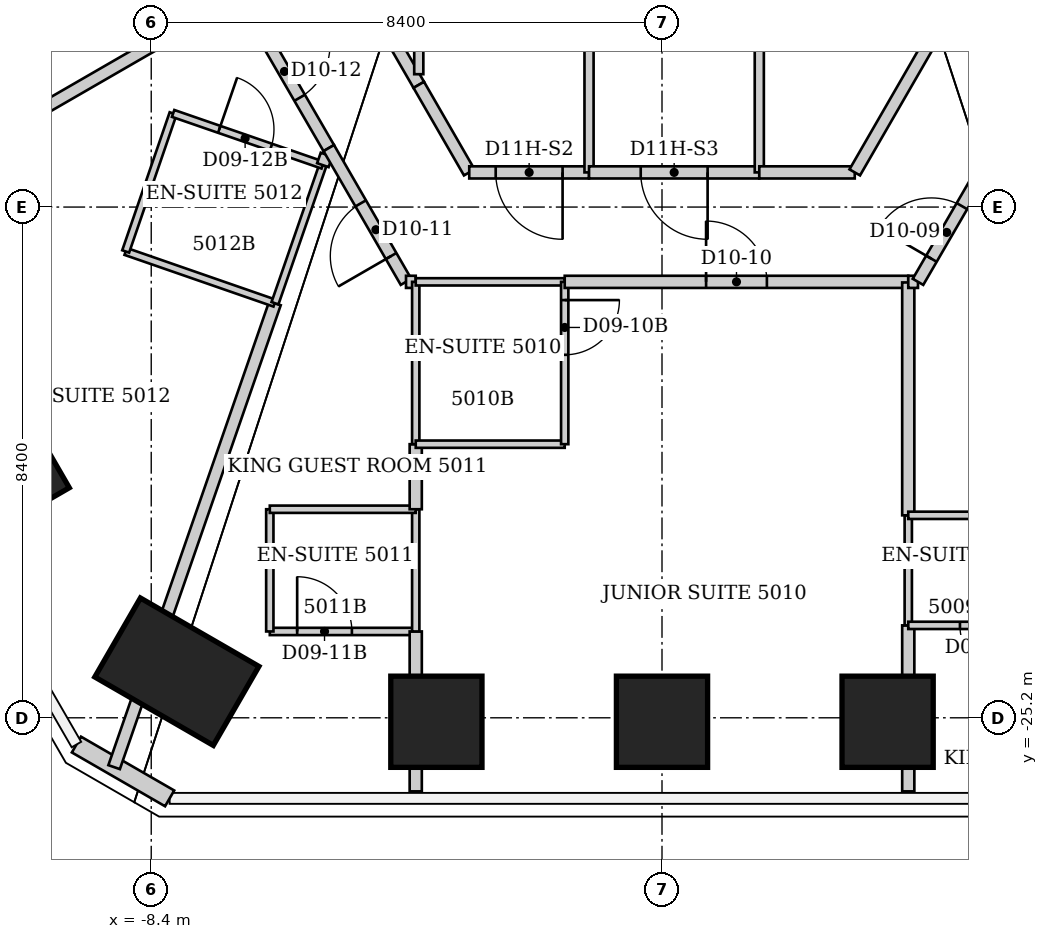
"""IFC4 building model, lengths in metres.
Left out: names, types, materials, properties, quantities, classifications, styles, units other than length and angle.
Written with IfcOpenShell. Run it as: python <this file> out.ifc"""

import sys

from ifc_helpers import new_model, si_unit, direction, frame, frame_2d, origin, origin_2d, place, context, subcontext, project, spatial, rectangle, extrude, element, fill, save


model = new_model("IFC4")
c1 = context("Model", 3, precision=1e-05, world=origin(), true_north=direction((0.0, 1.0)))
c2 = subcontext(c1, "Body", "Model", "MODEL_VIEW")
j1 = project(units=[si_unit("LENGTHUNIT", "METRE"), si_unit("PLANEANGLEUNIT", "RADIAN")], contexts=[c1])
p1 = place(None, origin())
s1 = spatial("IfcSite", under=j1, at=p1, CompositionType="ELEMENT")
p2 = place(p1, origin())
s2 = spatial("IfcBuilding", under=s1, at=p2, CompositionType="ELEMENT")
p3 = place(p2, frame((0.0, 0.0, 202.2)))
s3 = spatial("IfcBuildingStorey", under=s2, at=p3, CompositionType="ELEMENT", Elevation=202.2)
for number, where, z_axis, x_axis in (
    (1, (3.71, -25.265, 0.0), (0.0, 0.0, 1.0), (0.0, -1.0, 0.0)),
    (2, (0.0, -25.265, 0.0), (0.0, 0.0, 1.0), (0.0, -1.0, 0.0)),
    (3, (-3.71, -25.265, 0.0), (0.0, 0.0, 1.0), (0.0, -1.0, 0.0)),
):
    element("IfcColumn", number, at=place(p3, frame(where, z_axis=z_axis, x_axis=x_axis)), inside=s3, PredefinedType="COLUMN", context=c2, shape_type="SweptSolid", body=[
        extrude(rectangle(XDim=1.5, YDim=1.5, at=origin_2d()), origin(), (0.0, 0.0, 1.0), 3.8),
    ])
p4 = place(p3, frame((-7.979, -24.442, 0.0), z_axis=(0.0, 0.0, 1.0), x_axis=(-0.5, -0.866025403784, 0.0)))
e4 = element("IfcColumn", 4, at=p4, inside=s3, PredefinedType="COLUMN", context=c2, shape_type="SweptSolid", body=[
    extrude(rectangle(XDim=1.5, YDim=2.25, at=origin_2d()), origin(), (0.0, 0.0, 1.0), 3.8),
])
p5 = place(p3, frame((-10.772, -21.142, 0.0), z_axis=(0.0, 0.0, 1.0), x_axis=(-0.866025403784, -0.5, 0.0)))
e5 = element("IfcColumn", 5, at=p5, inside=s3, PredefinedType="COLUMN", context=c2, shape_type="SweptSolid", body=[
    extrude(rectangle(XDim=1.5, YDim=1.5, at=origin_2d()), origin(), (0.0, 0.0, 1.0), 3.8),
])
p6 = place(p3, frame((-8.097, -26.525, 0.0), z_axis=(0.0, 0.0, 1.0), x_axis=(-0.866036293601, 0.499981137809, 0.0)))
e6 = element("IfcWall", 6, at=p6, inside=s3, PredefinedType="SOLIDWALL", context=c2, shape_type="SweptSolid", body=[
    extrude(rectangle(XDim=1.77, YDim=0.3, at=frame_2d((0.885, 0.0))), origin(), (0.0, 0.0, 1.0), 3.64),
])
p7 = place(p3, frame((-14.274, -17.545, 0.0), z_axis=(0.0, 0.0, 1.0), x_axis=(0.865985626634, 0.500068889717, 0.0)))
e7 = element("IfcWall", 7, at=p7, inside=s3, PredefinedType="PARTITIONING", context=c2, shape_type="SweptSolid", body=[
    extrude(rectangle(XDim=8.459, YDim=0.2, at=frame_2d((4.229, 0.0))), origin(), (0.0, 0.0, 1.0), 3.64),
])
p8 = place(p3, frame((-9.01, -26.012, 0.0), z_axis=(0.0, 0.0, 1.0), x_axis=(0.32759647282, 0.944817734272, 0.0)))
e8 = element("IfcWall", 8, at=p8, inside=s3, PredefinedType="PARTITIONING", context=c2, shape_type="SweptSolid", body=[
    extrude(rectangle(XDim=8.075, YDim=0.2, at=frame_2d((4.038, 0.0))), origin(), (0.0, 0.0, 1.0), 3.64),
])
p9 = place(p3, frame((-8.82, -17.53, 0.0), z_axis=(0.0, 0.0, 1.0), x_axis=(0.944753042377, -0.327782990589, 0.0)))
e9 = element("IfcWall", 9, at=p9, inside=s3, PredefinedType="PARTITIONING", context=c2, shape_type="SweptSolid", body=[
    extrude(rectangle(XDim=2.594, YDim=0.12, at=frame_2d((1.297, 0.0))), origin(), (0.0, 0.0, 1.0), 3.64),
])
p10 = place(p3, frame((-8.04, -15.26, 0.0), z_axis=(0.0, 0.0, 1.0), x_axis=(-0.324971746724, -0.945723724896, 0.0)))
e10 = element("IfcWall", 10, at=p10, inside=s3, PredefinedType="PARTITIONING", context=c2, shape_type="SweptSolid", body=[
    extrude(rectangle(XDim=2.4, YDim=0.12, at=frame_2d((1.2, 0.0))), origin(), (0.0, 0.0, 1.0), 3.64),
])
p11 = place(p3, frame((-6.94, -13.31, 0.0), z_axis=(0.0, 0.0, 1.0), x_axis=(0.501293994647, -0.865277025542, 0.0)))
e11 = element("IfcWall", 11, at=p11, inside=s3, PredefinedType="PARTITIONING", context=c2, shape_type="SweptSolid", body=[
    extrude(rectangle(XDim=2.912, YDim=0.2, at=frame_2d((1.456, 0.0))), origin(), (0.0, 0.0, 1.0), 3.64),
])
p12 = place(p11, frame((0.956, 0.0, 0.0)))
e12 = element("IfcOpeningElement", 12, at=p12, cuts=e11, PredefinedType="OPENING", context=c2, shape_type="SweptSolid", body=[
    extrude(rectangle(XDim=1.0, YDim=2.13, at=frame_2d((0.5, 1.065))), frame((0.0, 0.1, 0.0), z_axis=(0.0, -1.0, 0.0), x_axis=(1.0, 0.0, 0.0)), (0.0, 0.0, 1.0), 0.2),
])
p13 = place(p3, frame((-6.45, -23.78, 0.0), z_axis=(0.0, 0.0, 1.0), x_axis=(1.0, 0.0, 0.0)))
e13 = element("IfcWall", 13, at=p13, inside=s3, PredefinedType="PARTITIONING", context=c2, shape_type="SweptSolid", body=[
    extrude(rectangle(XDim=2.4, YDim=0.12, at=frame_2d((1.2, 0.0))), origin(), (0.0, 0.0, 1.0), 3.64),
])
p14 = place(p13, frame((0.45, 0.0, 0.0)))
e14 = element("IfcOpeningElement", 14, at=p14, cuts=e13, PredefinedType="OPENING", context=c2, shape_type="SweptSolid", body=[
    extrude(rectangle(XDim=0.9, YDim=2.03, at=frame_2d((0.45, 1.015))), frame((0.0, 0.06, 0.0), z_axis=(0.0, -1.0, 0.0), x_axis=(1.0, 0.0, 0.0)), (0.0, 0.0, 1.0), 0.12),
])
p15 = place(p3, frame((-6.45, -21.77, 0.0), z_axis=(0.0, 0.0, 1.0), x_axis=(0.0, -1.0, 0.0)))
e15 = element("IfcWall", 15, at=p15, inside=s3, PredefinedType="PARTITIONING", context=c2, shape_type="SweptSolid", body=[
    extrude(rectangle(XDim=2.01, YDim=0.12, at=frame_2d((1.005, 0.0))), origin(), (0.0, 0.0, 1.0), 3.64),
])
p16 = place(p3, frame((-6.365, -18.382, 0.0), z_axis=(0.0, 0.0, 1.0), x_axis=(0.327571022417, 0.944826558302, 0.0)))
e16 = element("IfcWall", 16, at=p16, inside=s3, PredefinedType="PARTITIONING", context=c2, shape_type="SweptSolid", body=[
    extrude(rectangle(XDim=2.404, YDim=0.12, at=frame_2d((1.202, 0.0))), origin(), (0.0, 0.0, 1.0), 3.64),
])
p17 = place(p3, frame((-5.58, -16.11, 0.0), z_axis=(0.0, 0.0, 1.0), x_axis=(-0.94515546045, 0.326620813149, 0.0)))
e17 = element("IfcWall", 17, at=p17, inside=s3, PredefinedType="PARTITIONING", context=c2, shape_type="SweptSolid", body=[
    extrude(rectangle(XDim=2.603, YDim=0.12, at=frame_2d((1.301, 0.0))), origin(), (0.0, 0.0, 1.0), 3.64),
])
p18 = place(p17, frame((0.9, 0.0, 0.0)))
e18 = element("IfcOpeningElement", 18, at=p18, cuts=e17, PredefinedType="OPENING", context=c2, shape_type="SweptSolid", body=[
    extrude(rectangle(XDim=0.9, YDim=2.03, at=frame_2d((0.45, 1.015))), frame((0.0, 0.06, 0.0), z_axis=(0.0, -1.0, 0.0), x_axis=(1.0, 0.0, 0.0)), (0.0, 0.0, 1.0), 0.12),
])
p19 = place(p3, frame((-5.577, -16.111, 0.0), z_axis=(0.0, 0.0, 1.0), x_axis=(0.328260778463, 0.944587138025, 0.0)))
e19 = element("IfcWall", 19, at=p19, inside=s3, PredefinedType="PARTITIONING", context=c2, shape_type="SweptSolid", body=[
    extrude(rectangle(XDim=0.182, YDim=0.2, at=frame_2d((0.091, 0.0))), origin(), (0.0, 0.0, 1.0), 3.64),
])
p20 = place(p3, frame((-5.48, -15.83, 0.0), z_axis=(0.0, 0.0, 1.0), x_axis=(0.499963722229, -0.866046347752, 0.0)))
e20 = element("IfcWall", 20, at=p20, inside=s3, PredefinedType="PARTITIONING", context=c2, shape_type="SweptSolid", body=[
    extrude(rectangle(XDim=2.54, YDim=0.2, at=frame_2d((1.27, 0.0))), origin(), (0.0, 0.0, 1.0), 3.64),
])
p21 = place(p20, frame((1.05, 0.0, 0.0)))
e21 = element("IfcOpeningElement", 21, at=p21, cuts=e20, PredefinedType="OPENING", context=c2, shape_type="SweptSolid", body=[
    extrude(rectangle(XDim=1.0, YDim=2.13, at=frame_2d((0.5, 1.065))), frame((0.0, 0.1, 0.0), z_axis=(0.0, -1.0, 0.0), x_axis=(1.0, 0.0, 0.0)), (0.0, 0.0, 1.0), 0.2),
])
p22 = place(p3, frame((-4.21, -18.03, 0.0), z_axis=(0.0, 0.0, 1.0), x_axis=(1.0, 0.0, 0.0)))
e22 = element("IfcWall", 22, at=p22, inside=s3, PredefinedType="PARTITIONING", context=c2, shape_type="SweptSolid", body=[
    extrude(rectangle(XDim=0.16, YDim=0.2, at=frame_2d((0.08, 0.0))), origin(), (0.0, 0.0, 1.0), 3.64),
])
p23 = place(p3, frame((-4.05, -26.41, 0.0), z_axis=(0.0, 0.0, 1.0), x_axis=(0.0, 1.0, 0.0)))
e23 = element("IfcWall", 23, at=p23, inside=s3, PredefinedType="PARTITIONING", context=c2, shape_type="SweptSolid", body=[
    extrude(rectangle(XDim=2.63, YDim=0.2, at=frame_2d((1.315, 0.0))), origin(), (0.0, 0.0, 1.0), 3.64),
])
p24 = place(p3, frame((-4.05, -23.78, 0.0), z_axis=(0.0, 0.0, 1.0), x_axis=(0.0, 1.0, 0.0)))
e24 = element("IfcWall", 24, at=p24, inside=s3, PredefinedType="PARTITIONING", context=c2, shape_type="SweptSolid", body=[
    extrude(rectangle(XDim=2.01, YDim=0.12, at=frame_2d((1.005, 0.0))), origin(), (0.0, 0.0, 1.0), 3.64),
])
p25 = place(p3, frame((-4.05, -21.77, 0.0), z_axis=(0.0, 0.0, 1.0), x_axis=(-1.0, 0.0, 0.0)))
e25 = element("IfcWall", 25, at=p25, inside=s3, PredefinedType="PARTITIONING", context=c2, shape_type="SweptSolid", body=[
    extrude(rectangle(XDim=2.4, YDim=0.12, at=frame_2d((1.2, 0.0))), origin(), (0.0, 0.0, 1.0), 3.64),
])
p26 = place(p3, frame((-4.05, -21.77, 0.0), z_axis=(0.0, 0.0, 1.0), x_axis=(0.0, 1.0, 0.0)))
e26 = element("IfcWall", 26, at=p26, inside=s3, PredefinedType="PARTITIONING", context=c2, shape_type="SweptSolid", body=[
    extrude(rectangle(XDim=1.07, YDim=0.2, at=frame_2d((0.535, 0.0))), origin(), (0.0, 0.0, 1.0), 3.64),
])
p27 = place(p3, frame((-4.05, -20.7, 0.0), z_axis=(0.0, 0.0, 1.0), x_axis=(0.0, 1.0, 0.0)))
e27 = element("IfcWall", 27, at=p27, inside=s3, PredefinedType="PARTITIONING", context=c2, shape_type="SweptSolid", body=[
    extrude(rectangle(XDim=2.67, YDim=0.12, at=frame_2d((1.335, 0.0))), origin(), (0.0, 0.0, 1.0), 3.64),
])
for number, where, z_axis, x_axis in (
    (28, (-4.05, -20.7, 0.0), (0.0, 0.0, 1.0), (1.0, 0.0, 0.0)),
    (29, (-4.05, -18.03, 0.0), (0.0, 0.0, 1.0), (1.0, 0.0, 0.0)),
):
    element("IfcWall", number, at=place(p3, frame(where, z_axis=z_axis, x_axis=x_axis)), inside=s3, PredefinedType="PARTITIONING", context=c2, shape_type="SweptSolid", body=[
        extrude(rectangle(XDim=2.45, YDim=0.12, at=frame_2d((1.225, 0.0))), origin(), (0.0, 0.0, 1.0), 3.64),
    ])
p28 = place(p3, frame((-4.0, -14.79, 0.0), z_axis=(0.0, 0.0, 1.0), x_axis=(-0.499916512745, 0.866073599808, 0.0)))
e30 = element("IfcWall", 30, at=p28, inside=s3, PredefinedType="PARTITIONING", context=c2, shape_type="SweptSolid", body=[
    extrude(rectangle(XDim=8.821, YDim=0.2, at=frame_2d((4.411, 0.0))), origin(), (0.0, 0.0, 1.0), 3.64),
])
p29 = place(p28, frame((3.861, 0.0, 0.0)))
e31 = element("IfcOpeningElement", 31, at=p29, cuts=e30, PredefinedType="OPENING", context=c2, shape_type="SweptSolid", body=[
    extrude(rectangle(XDim=1.1, YDim=2.2, at=frame_2d((0.55, 1.1))), frame((0.0, 0.1, 0.0), z_axis=(0.0, -1.0, 0.0), x_axis=(1.0, 0.0, 0.0)), (0.0, 0.0, 1.0), 0.2),
])
p30 = place(p3, frame((-4.0, -7.1, 0.0), z_axis=(0.0, 0.0, 1.0), x_axis=(0.0, -1.0, 0.0)))
e32 = element("IfcWall", 32, at=p30, inside=s3, PredefinedType="PARTITIONING", context=c2, shape_type="SweptSolid", body=[
    extrude(rectangle(XDim=7.515, YDim=0.15, at=frame_2d((3.757, 0.0))), origin(), (0.0, 0.0, 1.0), 3.64),
])
p31 = place(p3, frame((-3.17, -16.23, 0.0), z_axis=(0.0, 0.0, 1.0), x_axis=(-0.499425709803, 0.866356716594, 0.0)))
e33 = element("IfcWall", 33, at=p31, inside=s3, PredefinedType="PARTITIONING", context=c2, shape_type="SweptSolid", body=[
    extrude(rectangle(XDim=1.662, YDim=0.2, at=frame_2d((0.831, 0.0))), origin(), (0.0, 0.0, 1.0), 3.64),
])
p32 = place(p3, frame((-1.6, -20.7, 0.0), z_axis=(0.0, 0.0, 1.0), x_axis=(0.0, 1.0, 0.0)))
e34 = element("IfcWall", 34, at=p32, inside=s3, PredefinedType="PARTITIONING", context=c2, shape_type="SweptSolid", body=[
    extrude(rectangle(XDim=2.67, YDim=0.12, at=frame_2d((1.335, 0.0))), origin(), (0.0, 0.0, 1.0), 3.64),
])
p33 = place(p32, frame((1.47, 0.0, 0.0)))
e35 = element("IfcOpeningElement", 35, at=p33, cuts=e34, PredefinedType="OPENING", context=c2, shape_type="SweptSolid", body=[
    extrude(rectangle(XDim=0.9, YDim=2.03, at=frame_2d((0.45, 1.015))), frame((0.0, 0.06, 0.0), z_axis=(0.0, -1.0, 0.0), x_axis=(1.0, 0.0, 0.0)), (0.0, 0.0, 1.0), 0.12),
])
p34 = place(p3, frame((-1.6, -18.03, 0.0), z_axis=(0.0, 0.0, 1.0), x_axis=(1.0, 0.0, 0.0)))
e36 = element("IfcWall", 36, at=p34, inside=s3, PredefinedType="PARTITIONING", context=c2, shape_type="SweptSolid", body=[
    extrude(rectangle(XDim=5.65, YDim=0.2, at=frame_2d((2.825, 0.0))), origin(), (0.0, 0.0, 1.0), 3.64),
])
p35 = place(p34, frame((2.325, 0.0, 0.0)))
e37 = element("IfcOpeningElement", 37, at=p35, cuts=e36, PredefinedType="OPENING", context=c2, shape_type="SweptSolid", body=[
    extrude(rectangle(XDim=1.0, YDim=2.13, at=frame_2d((0.5, 1.065))), frame((0.0, 0.1, 0.0), z_axis=(0.0, -1.0, 0.0), x_axis=(1.0, 0.0, 0.0)), (0.0, 0.0, 1.0), 0.2),
])
p36 = place(p3, frame((-1.2, -16.23, 0.0), z_axis=(0.0, 0.0, 1.0), x_axis=(-1.0, 0.0, 0.0)))
e38 = element("IfcWall", 38, at=p36, inside=s3, PredefinedType="PARTITIONING", context=c2, shape_type="SweptSolid", body=[
    extrude(rectangle(XDim=1.97, YDim=0.2, at=frame_2d((0.985, 0.0))), origin(), (0.0, 0.0, 1.0), 3.64),
])
p37 = place(p36, frame((0.435, 0.0, 0.0)))
e39 = element("IfcOpeningElement", 39, at=p37, cuts=e38, PredefinedType="OPENING", context=c2, shape_type="SweptSolid", body=[
    extrude(rectangle(XDim=1.1, YDim=2.2, at=frame_2d((0.55, 1.1))), frame((0.0, 0.1, 0.0), z_axis=(0.0, -1.0, 0.0), x_axis=(1.0, 0.0, 0.0)), (0.0, 0.0, 1.0), 0.2),
])
p38 = place(p3, frame((-1.2, -7.1, 0.0), z_axis=(0.0, 0.0, 1.0), x_axis=(0.0, -1.0, 0.0)))
e40 = element("IfcWall", 40, at=p38, inside=s3, PredefinedType="PARTITIONING", context=c2, shape_type="SweptSolid", body=[
    extrude(rectangle(XDim=9.13, YDim=0.15, at=frame_2d((4.565, 0.0))), origin(), (0.0, 0.0, 1.0), 3.64),
])
p39 = place(p3, frame((1.6, -16.23, 0.0), z_axis=(0.0, 0.0, 1.0), x_axis=(-1.0, 0.0, 0.0)))
e41 = element("IfcWall", 41, at=p39, inside=s3, PredefinedType="PARTITIONING", context=c2, shape_type="SweptSolid", body=[
    extrude(rectangle(XDim=2.8, YDim=0.2, at=frame_2d((1.4, 0.0))), origin(), (0.0, 0.0, 1.0), 3.64),
])
p40 = place(p39, frame((0.85, 0.0, 0.0)))
e42 = element("IfcOpeningElement", 42, at=p40, cuts=e41, PredefinedType="OPENING", context=c2, shape_type="SweptSolid", body=[
    extrude(rectangle(XDim=1.1, YDim=2.2, at=frame_2d((0.55, 1.1))), frame((0.0, 0.1, 0.0), z_axis=(0.0, -1.0, 0.0), x_axis=(1.0, 0.0, 0.0)), (0.0, 0.0, 1.0), 0.2),
])
p41 = place(p3, frame((1.6, -7.1, 0.0), z_axis=(0.0, 0.0, 1.0), x_axis=(0.0, -1.0, 0.0)))
e43 = element("IfcWall", 43, at=p41, inside=s3, PredefinedType="PARTITIONING", context=c2, shape_type="SweptSolid", body=[
    extrude(rectangle(XDim=9.13, YDim=0.15, at=frame_2d((4.565, 0.0))), origin(), (0.0, 0.0, 1.0), 3.64),
])
p42 = place(p3, frame((3.17, -16.23, 0.0), z_axis=(0.0, 0.0, 1.0), x_axis=(-1.0, 0.0, 0.0)))
e44 = element("IfcWall", 44, at=p42, inside=s3, PredefinedType="PARTITIONING", context=c2, shape_type="SweptSolid", body=[
    extrude(rectangle(XDim=1.57, YDim=0.2, at=frame_2d((0.785, 0.0))), origin(), (0.0, 0.0, 1.0), 3.64),
])
p43 = place(p3, frame((4.05, -26.41, 0.0), z_axis=(0.0, 0.0, 1.0), x_axis=(0.0, 1.0, 0.0)))
e45 = element("IfcWall", 45, at=p43, inside=s3, PredefinedType="PARTITIONING", context=c2, shape_type="SweptSolid", body=[
    extrude(rectangle(XDim=2.73, YDim=0.2, at=frame_2d((1.365, 0.0))), origin(), (0.0, 0.0, 1.0), 3.64),
])
p44 = place(p3, frame((4.05, -23.68, 0.0), z_axis=(0.0, 0.0, 1.0), x_axis=(0.0, 1.0, 0.0)))
e46 = element("IfcWall", 46, at=p44, inside=s3, PredefinedType="PARTITIONING", context=c2, shape_type="SweptSolid", body=[
    extrude(rectangle(XDim=1.81, YDim=0.12, at=frame_2d((0.905, 0.0))), origin(), (0.0, 0.0, 1.0), 3.64),
])
p45 = place(p3, frame((4.05, -23.68, 0.0), z_axis=(0.0, 0.0, 1.0), x_axis=(1.0, 0.0, 0.0)))
e47 = element("IfcWall", 47, at=p45, inside=s3, PredefinedType="PARTITIONING", context=c2, shape_type="SweptSolid", body=[
    extrude(rectangle(XDim=2.2, YDim=0.12, at=frame_2d((1.1, 0.0))), origin(), (0.0, 0.0, 1.0), 3.64),
])
p46 = place(p45, frame((0.85, 0.0, 0.0)))
e48 = element("IfcOpeningElement", 48, at=p46, cuts=e47, PredefinedType="OPENING", context=c2, shape_type="SweptSolid", body=[
    extrude(rectangle(XDim=0.9, YDim=2.03, at=frame_2d((0.45, 1.015))), frame((0.0, 0.06, 0.0), z_axis=(0.0, -1.0, 0.0), x_axis=(1.0, 0.0, 0.0)), (0.0, 0.0, 1.0), 0.12),
])
p47 = place(p3, frame((4.05, -21.87, 0.0), z_axis=(0.0, 0.0, 1.0), x_axis=(0.0, 1.0, 0.0)))
e49 = element("IfcWall", 49, at=p47, inside=s3, PredefinedType="PARTITIONING", context=c2, shape_type="SweptSolid", body=[
    extrude(rectangle(XDim=3.83, YDim=0.2, at=frame_2d((1.915, 0.0))), origin(), (0.0, 0.0, 1.0), 3.64),
])
p48 = place(p3, frame((4.05, -18.03, 0.0), z_axis=(0.0, 0.0, 1.0), x_axis=(1.0, 0.0, 0.0)))
e50 = element("IfcWall", 50, at=p48, inside=s3, PredefinedType="PARTITIONING", context=c2, shape_type="SweptSolid", body=[
    extrude(rectangle(XDim=0.16, YDim=0.2, at=frame_2d((0.08, 0.0))), origin(), (0.0, 0.0, 1.0), 3.64),
])
p49 = place(p3, frame((5.51, -15.79, 0.0), z_axis=(0.0, 0.0, 1.0), x_axis=(-0.501964949025, -0.864887963814, 0.0)))
e51 = element("IfcWall", 51, at=p49, inside=s3, PredefinedType="PARTITIONING", context=c2, shape_type="SweptSolid", body=[
    extrude(rectangle(XDim=2.59, YDim=0.2, at=frame_2d((1.295, 0.0))), origin(), (0.0, 0.0, 1.0), 3.64),
])
p50 = place(p49, frame((1.15, 0.0, 0.0)))
e52 = element("IfcOpeningElement", 52, at=p50, cuts=e51, PredefinedType="OPENING", context=c2, shape_type="SweptSolid", body=[
    extrude(rectangle(XDim=1.0, YDim=2.13, at=frame_2d((0.5, 1.065))), frame((0.0, 0.1, 0.0), z_axis=(0.0, -1.0, 0.0), x_axis=(1.0, 0.0, 0.0)), (0.0, 0.0, 1.0), 0.2),
])
p51 = place(p3, frame((6.25, -21.87, 0.0), z_axis=(0.0, 0.0, 1.0), x_axis=(-1.0, 0.0, 0.0)))
e53 = element("IfcWall", 53, at=p51, inside=s3, PredefinedType="PARTITIONING", context=c2, shape_type="SweptSolid", body=[
    extrude(rectangle(XDim=2.2, YDim=0.12, at=frame_2d((1.1, 0.0))), origin(), (0.0, 0.0, 1.0), 3.64),
])
p52 = place(p3, frame((8.41, -7.15, 0.0), z_axis=(0.0, 0.0, 1.0), x_axis=(-0.499828628176, -0.866124322748, 0.0)))
e54 = element("IfcWall", 54, at=p52, inside=s3, PredefinedType="PARTITIONING", context=c2, shape_type="SweptSolid", body=[
    extrude(rectangle(XDim=10.484, YDim=0.2, at=frame_2d((5.242, 0.0))), origin(), (0.0, 0.0, 1.0), 3.64),
])
p53 = place(p52, frame((4.692, 0.0, 0.0)))
e55 = element("IfcOpeningElement", 55, at=p53, cuts=e54, PredefinedType="OPENING", context=c2, shape_type="SweptSolid", body=[
    extrude(rectangle(XDim=1.1, YDim=2.2, at=frame_2d((0.55, 1.1))), frame((0.0, 0.1, 0.0), z_axis=(0.0, -1.0, 0.0), x_axis=(1.0, 0.0, 0.0)), (0.0, 0.0, 1.0), 0.2),
])
p54 = place(p50, origin())
e56 = element("IfcDoor", 56, at=p54, inside=s3, OperationType="SINGLE_SWING_RIGHT", PredefinedType="DOOR", context=c2, shape_type="SweptSolid", body=[
    extrude(rectangle(XDim=1.0, YDim=2.13, at=frame_2d((0.5, 1.065))), frame((0.0, 0.025, 0.0), z_axis=(0.0, -1.0, 0.0), x_axis=(1.0, 0.0, 0.0)), (0.0, 0.0, 1.0), 0.05),
])
fill(e52, e56)
p55 = place(p46, origin())
e57 = element("IfcDoor", 57, at=p55, inside=s3, OperationType="SINGLE_SWING_RIGHT", PredefinedType="DOOR", context=c2, shape_type="SweptSolid", body=[
    extrude(rectangle(XDim=0.9, YDim=2.03, at=frame_2d((0.45, 1.015))), frame((0.0, 0.025, 0.0), z_axis=(0.0, -1.0, 0.0), x_axis=(1.0, 0.0, 0.0)), (0.0, 0.0, 1.0), 0.05),
])
fill(e48, e57)
p56 = place(p35, origin())
e58 = element("IfcDoor", 58, at=p56, inside=s3, OperationType="SINGLE_SWING_LEFT", PredefinedType="DOOR", context=c2, shape_type="SweptSolid", body=[
    extrude(rectangle(XDim=1.0, YDim=2.13, at=frame_2d((0.5, 1.065))), frame((0.0, 0.025, 0.0), z_axis=(0.0, -1.0, 0.0), x_axis=(1.0, 0.0, 0.0)), (0.0, 0.0, 1.0), 0.05),
])
fill(e37, e58)
p57 = place(p33, origin())
e59 = element("IfcDoor", 59, at=p57, inside=s3, OperationType="SINGLE_SWING_RIGHT", PredefinedType="DOOR", context=c2, shape_type="SweptSolid", body=[
    extrude(rectangle(XDim=0.9, YDim=2.03, at=frame_2d((0.45, 1.015))), frame((0.0, 0.025, 0.0), z_axis=(0.0, -1.0, 0.0), x_axis=(1.0, 0.0, 0.0)), (0.0, 0.0, 1.0), 0.05),
])
fill(e35, e59)
p58 = place(p21, origin())
e60 = element("IfcDoor", 60, at=p58, inside=s3, OperationType="SINGLE_SWING_RIGHT", PredefinedType="DOOR", context=c2, shape_type="SweptSolid", body=[
    extrude(rectangle(XDim=1.0, YDim=2.13, at=frame_2d((0.5, 1.065))), frame((0.0, 0.025, 0.0), z_axis=(0.0, -1.0, 0.0), x_axis=(1.0, 0.0, 0.0)), (0.0, 0.0, 1.0), 0.05),
])
fill(e21, e60)
p59 = place(p14, origin())
e61 = element("IfcDoor", 61, at=p59, inside=s3, OperationType="SINGLE_SWING_LEFT", PredefinedType="DOOR", context=c2, shape_type="SweptSolid", body=[
    extrude(rectangle(XDim=0.9, YDim=2.03, at=frame_2d((0.45, 1.015))), frame((0.0, 0.025, 0.0), z_axis=(0.0, -1.0, 0.0), x_axis=(1.0, 0.0, 0.0)), (0.0, 0.0, 1.0), 0.05),
])
fill(e14, e61)
p60 = place(p12, origin())
e62 = element("IfcDoor", 62, at=p60, inside=s3, OperationType="SINGLE_SWING_LEFT", PredefinedType="DOOR", context=c2, shape_type="SweptSolid", body=[
    extrude(rectangle(XDim=1.0, YDim=2.13, at=frame_2d((0.5, 1.065))), frame((0.0, 0.025, 0.0), z_axis=(0.0, -1.0, 0.0), x_axis=(1.0, 0.0, 0.0)), (0.0, 0.0, 1.0), 0.05),
])
fill(e12, e62)
p61 = place(p18, origin())
e63 = element("IfcDoor", 63, at=p61, inside=s3, OperationType="SINGLE_SWING_RIGHT", PredefinedType="DOOR", context=c2, shape_type="SweptSolid", body=[
    extrude(rectangle(XDim=0.9, YDim=2.03, at=frame_2d((0.45, 1.015))), frame((0.0, 0.025, 0.0), z_axis=(0.0, -1.0, 0.0), x_axis=(1.0, 0.0, 0.0)), (0.0, 0.0, 1.0), 0.05),
])
fill(e18, e63)
p62 = place(p37, origin())
e64 = element("IfcDoor", 64, at=p62, inside=s3, OperationType="SINGLE_SWING_LEFT", PredefinedType="DOOR", context=c2, shape_type="SweptSolid", body=[
    extrude(rectangle(XDim=1.1, YDim=2.2, at=frame_2d((0.55, 1.1))), frame((0.0, 0.025, 0.0), z_axis=(0.0, -1.0, 0.0), x_axis=(1.0, 0.0, 0.0)), (0.0, 0.0, 1.0), 0.05),
])
fill(e39, e64)
p63 = place(p40, origin())
e65 = element("IfcDoor", 65, at=p63, inside=s3, OperationType="SINGLE_SWING_LEFT", PredefinedType="DOOR", context=c2, shape_type="SweptSolid", body=[
    extrude(rectangle(XDim=1.1, YDim=2.2, at=frame_2d((0.55, 1.1))), frame((0.0, 0.025, 0.0), z_axis=(0.0, -1.0, 0.0), x_axis=(1.0, 0.0, 0.0)), (0.0, 0.0, 1.0), 0.05),
])
fill(e42, e65)
save(model, sys.argv[1])
